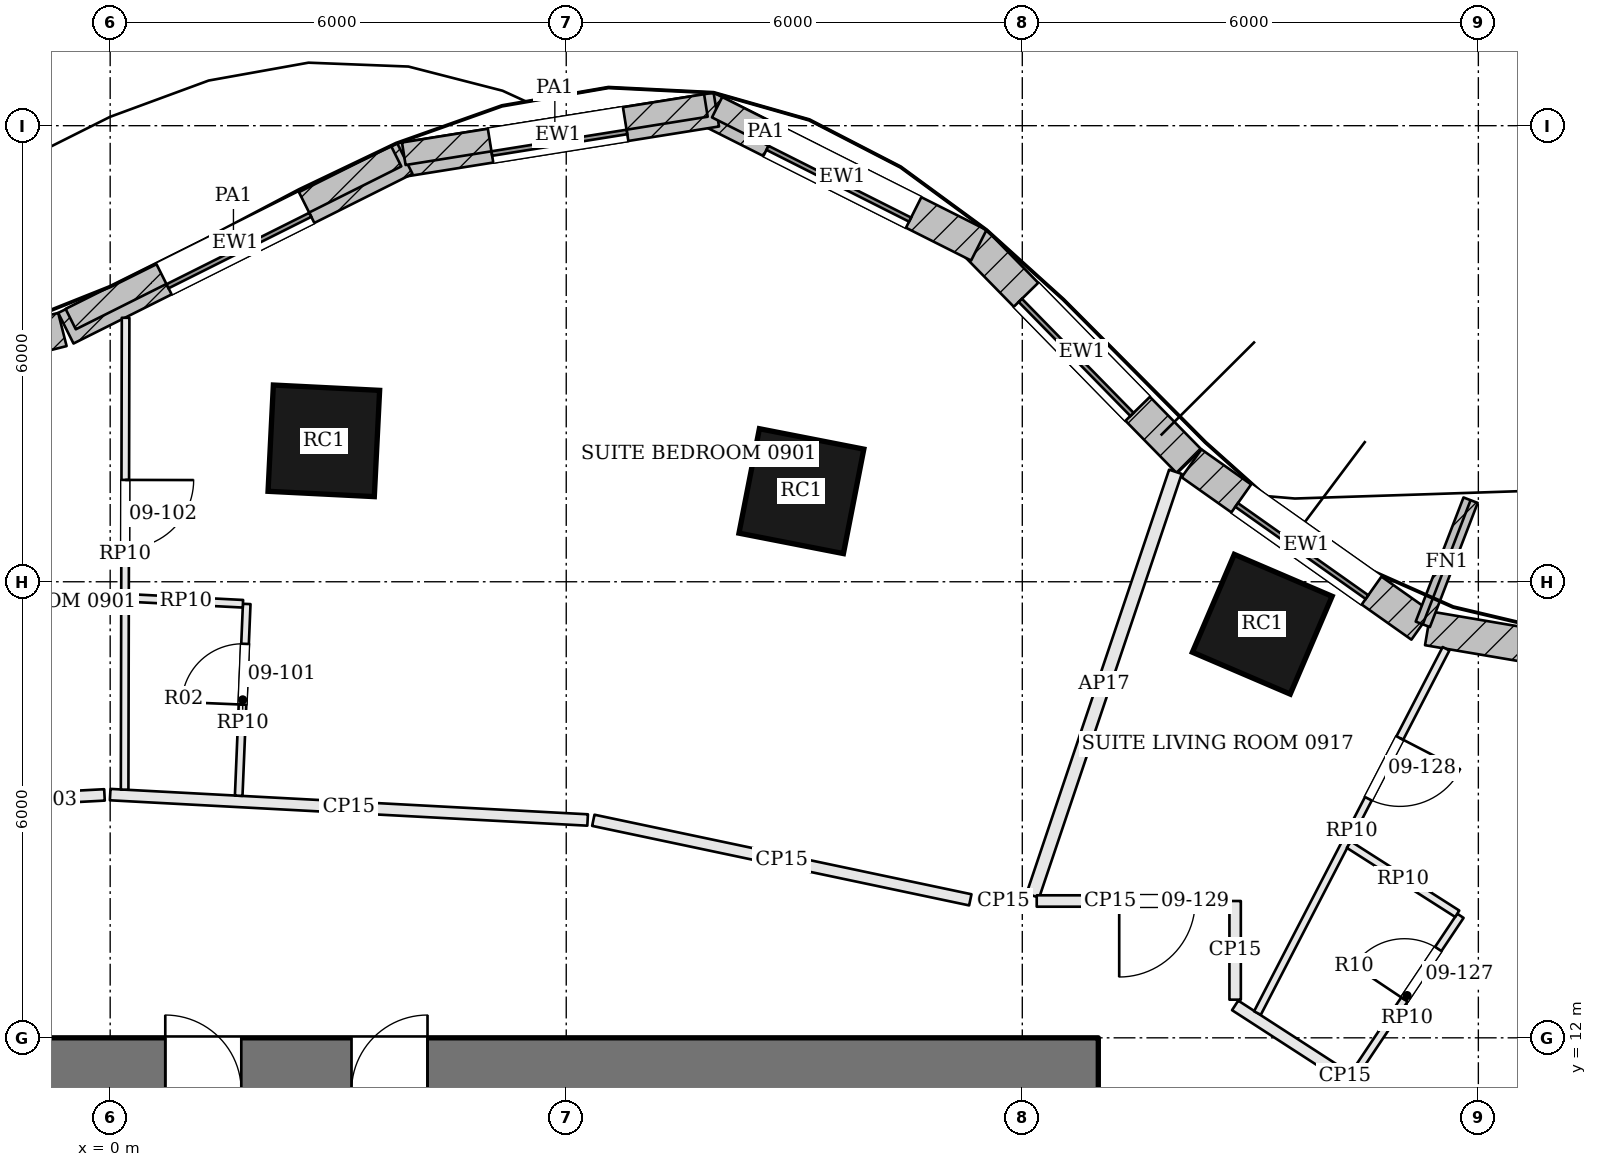
"""IFC4 building model, lengths in metres.
Left out: names, types, materials, properties, quantities, classifications, styles, units other than length and angle.
Written with IfcOpenShell. Run it as: python <this file> out.ifc"""

import sys

from ifc_helpers import new_model, si_unit, direction, frame, frame_2d, origin, origin_2d, place, context, subcontext, project, spatial, rectangle, extrude, element, fill, save


model = new_model("IFC4")
c1 = context("Model", 3, precision=1e-05, world=origin(), true_north=direction((0.0, 1.0)))
c2 = subcontext(c1, "Body", "Model", "MODEL_VIEW")
j1 = project(units=[si_unit("LENGTHUNIT", "METRE"), si_unit("PLANEANGLEUNIT", "RADIAN")], contexts=[c1])
p1 = place(None, origin())
s1 = spatial("IfcSite", under=j1, at=p1, CompositionType="ELEMENT")
p2 = place(p1, origin())
s2 = spatial("IfcBuilding", under=s1, at=p2, CompositionType="ELEMENT")
p3 = place(p2, frame((0.0, 0.0, 48.3)))
s3 = spatial("IfcBuildingStorey", under=s2, at=p3, CompositionType="ELEMENT", Elevation=48.3)
p4 = place(p3, frame((-13.0, 11.3, 0.0), z_axis=(0.0, 0.0, 1.0), x_axis=(1.0, 0.0, 0.0)))
e1 = element("IfcWall", 1, at=p4, inside=s3, PredefinedType="SHEAR", context=c2, shape_type="SweptSolid", body=[
    extrude(rectangle(XDim=26.0, YDim=1.4, at=frame_2d((13.0, 0.0))), origin(), (0.0, 0.0, 1.0), 3.6),
])
p5 = place(p4, frame((8.575, 0.0, 0.0)))
e2 = element("IfcOpeningElement", 2, at=p5, cuts=e1, PredefinedType="OPENING", context=c2, shape_type="SweptSolid", body=[
    extrude(rectangle(XDim=0.7, YDim=2.1, at=frame_2d((0.35, 1.05))), frame((0.0, 0.71, 0.0), z_axis=(0.0, -1.0, 0.0), x_axis=(1.0, 0.0, 0.0)), (0.0, 0.0, 1.0), 1.42),
])
p6 = place(p4, frame((10.875, 0.0, 0.0)))
e3 = element("IfcOpeningElement", 3, at=p6, cuts=e1, PredefinedType="OPENING", context=c2, shape_type="SweptSolid", body=[
    extrude(rectangle(XDim=1.0, YDim=2.1, at=frame_2d((0.5, 1.05))), frame((0.0, 0.71, 0.0), z_axis=(0.0, -1.0, 0.0), x_axis=(1.0, 0.0, 0.0)), (0.0, 0.0, 1.0), 1.42),
])
p7 = place(p4, frame((13.725, 0.0, 0.0)))
e4 = element("IfcOpeningElement", 4, at=p7, cuts=e1, PredefinedType="OPENING", context=c2, shape_type="SweptSolid", body=[
    extrude(rectangle(XDim=1.0, YDim=2.1, at=frame_2d((0.5, 1.05))), frame((0.0, 0.71, 0.0), z_axis=(0.0, -1.0, 0.0), x_axis=(1.0, 0.0, 0.0)), (0.0, 0.0, 1.0), 1.42),
])
p8 = place(p4, frame((16.175, 0.0, 0.0)))
e5 = element("IfcOpeningElement", 5, at=p8, cuts=e1, PredefinedType="OPENING", context=c2, shape_type="SweptSolid", body=[
    extrude(rectangle(XDim=1.0, YDim=2.1, at=frame_2d((0.5, 1.05))), frame((0.0, 0.71, 0.0), z_axis=(0.0, -1.0, 0.0), x_axis=(1.0, 0.0, 0.0)), (0.0, 0.0, 1.0), 1.42),
])
for number, where, z_axis, x_axis in (
    (6, (15.157, 17.441, 0.0), (0.0, 0.0, 1.0), (-0.919, 0.394, 0.0)),
    (7, (9.094, 19.192, 0.0), (0.0, 0.0, 1.0), (-0.981, 0.192, 0.0)),
    (8, (2.811, 19.854, 0.0), (0.0, 0.0, 1.0), (-0.999, 0.05, 0.0)),
):
    element("IfcColumn", number, at=place(p3, frame(where, z_axis=z_axis, x_axis=x_axis)), inside=s3, PredefinedType="COLUMN", context=c2, shape_type="SweptSolid", body=[
        extrude(rectangle(XDim=1.4, YDim=1.4, at=origin_2d()), origin(), (0.0, 0.0, 1.0), 3.6),
    ])
p9 = place(p3, frame((23.284, 16.376, 0.0), z_axis=(0.0, 0.0, 1.0), x_axis=(-0.985861729428, 0.167560885797, 0.0)))
e9 = element("IfcWall", 9, at=p9, inside=s3, PredefinedType="SOLIDWALL", context=c2, shape_type="SweptSolid", body=[
    extrude(rectangle(XDim=6.033, YDim=0.45, at=frame_2d((3.017, 0.0))), origin(), (0.0, 0.0, 1.0), 3.4),
])
p10 = place(p9, frame((1.967, 0.0, 0.9)))
e10 = element("IfcOpeningElement", 10, at=p10, cuts=e9, PredefinedType="OPENING", context=c2, shape_type="SweptSolid", body=[
    extrude(rectangle(XDim=2.1, YDim=2.0, at=frame_2d((1.05, 1.0))), frame((0.0, 0.235, 0.0), z_axis=(0.0, -1.0, 0.0), x_axis=(1.0, 0.0, 0.0)), (0.0, 0.0, 1.0), 0.47),
])
p11 = place(p3, frame((17.249, 17.422, 0.0), z_axis=(0.0, 0.0, 1.0), x_axis=(-0.816589291225, 0.577219134694, 0.0)))
e11 = element("IfcWall", 11, at=p11, inside=s3, PredefinedType="SOLIDWALL", context=c2, shape_type="SweptSolid", body=[
    extrude(rectangle(XDim=3.701, YDim=0.45, at=frame_2d((1.851, 0.0))), origin(), (0.0, 0.0, 1.0), 3.4),
])
p12 = place(p11, frame((0.801, 0.0, 0.9)))
e12 = element("IfcOpeningElement", 12, at=p12, cuts=e11, PredefinedType="OPENING", context=c2, shape_type="SweptSolid", body=[
    extrude(rectangle(XDim=2.1, YDim=2.0, at=frame_2d((1.05, 1.0))), frame((0.0, 0.235, 0.0), z_axis=(0.0, -1.0, 0.0), x_axis=(1.0, 0.0, 0.0)), (0.0, 0.0, 1.0), 0.47),
])
p13 = place(p3, frame((14.195, 19.584, 0.0), z_axis=(0.0, 0.0, 1.0), x_axis=(-0.69962350521, 0.714511687068, 0.0)))
e13 = element("IfcWall", 13, at=p13, inside=s3, PredefinedType="SOLIDWALL", context=c2, shape_type="SweptSolid", body=[
    extrude(rectangle(XDim=4.034, YDim=0.45, at=frame_2d((2.017, 0.0))), origin(), (0.0, 0.0, 1.0), 3.4),
])
p14 = place(p13, frame((0.967, 0.0, 0.9)))
e14 = element("IfcOpeningElement", 14, at=p14, cuts=e13, PredefinedType="OPENING", context=c2, shape_type="SweptSolid", body=[
    extrude(rectangle(XDim=2.1, YDim=2.0, at=frame_2d((1.05, 1.0))), frame((0.0, 0.235, 0.0), z_axis=(0.0, -1.0, 0.0), x_axis=(1.0, 0.0, 0.0)), (0.0, 0.0, 1.0), 0.47),
])
p15 = place(p3, frame((11.428, 22.427, 0.0), z_axis=(0.0, 0.0, 1.0), x_axis=(-0.893343208735, 0.449375023122, 0.0)))
e15 = element("IfcWall", 15, at=p15, inside=s3, PredefinedType="SOLIDWALL", context=c2, shape_type="SweptSolid", body=[
    extrude(rectangle(XDim=4.019, YDim=0.45, at=frame_2d((2.009, 0.0))), origin(), (0.0, 0.0, 1.0), 3.4),
])
p16 = place(p15, frame((0.959, 0.0, 0.9)))
e16 = element("IfcOpeningElement", 16, at=p16, cuts=e15, PredefinedType="OPENING", context=c2, shape_type="SweptSolid", body=[
    extrude(rectangle(XDim=2.1, YDim=2.0, at=frame_2d((1.05, 1.0))), frame((0.0, 0.235, 0.0), z_axis=(0.0, -1.0, 0.0), x_axis=(1.0, 0.0, 0.0)), (0.0, 0.0, 1.0), 0.47),
])
p17 = place(p3, frame((7.975, 24.212, 0.0), z_axis=(0.0, 0.0, 1.0), x_axis=(-0.987470607744, -0.157803038125, 0.0)))
e17 = element("IfcWall", 17, at=p17, inside=s3, PredefinedType="SOLIDWALL", context=c2, shape_type="SweptSolid", body=[
    extrude(rectangle(XDim=4.216, YDim=0.45, at=frame_2d((2.108, 0.0))), origin(), (0.0, 0.0, 1.0), 3.4),
])
p18 = place(p17, frame((1.208, 0.0, 0.9)))
e18 = element("IfcOpeningElement", 18, at=p18, cuts=e17, PredefinedType="OPENING", context=c2, shape_type="SweptSolid", body=[
    extrude(rectangle(XDim=1.8, YDim=2.0, at=frame_2d((0.9, 1.0))), frame((0.0, 0.235, 0.0), z_axis=(0.0, -1.0, 0.0), x_axis=(1.0, 0.0, 0.0)), (0.0, 0.0, 1.0), 0.47),
])
p19 = place(p3, frame((3.877, 23.568, 0.0), z_axis=(0.0, 0.0, 1.0), x_axis=(-0.894241088759, -0.447585606532, 0.0)))
e19 = element("IfcWall", 19, at=p19, inside=s3, PredefinedType="SOLIDWALL", context=c2, shape_type="SweptSolid", body=[
    extrude(rectangle(XDim=4.987, YDim=0.45, at=frame_2d((2.494, 0.0))), origin(), (0.0, 0.0, 1.0), 3.4),
])
p20 = place(p19, frame((1.444, 0.0, 0.9)))
e20 = element("IfcOpeningElement", 20, at=p20, cuts=e19, PredefinedType="OPENING", context=c2, shape_type="SweptSolid", body=[
    extrude(rectangle(XDim=2.1, YDim=2.0, at=frame_2d((1.05, 1.0))), frame((0.0, 0.235, 0.0), z_axis=(0.0, -1.0, 0.0), x_axis=(1.0, 0.0, 0.0)), (0.0, 0.0, 1.0), 0.47),
])
p21 = place(p3, frame((-0.628, 21.319, 0.0), z_axis=(0.0, 0.0, 1.0), x_axis=(-0.969240543873, -0.246115355295, 0.0)))
e21 = element("IfcWall", 21, at=p21, inside=s3, PredefinedType="SOLIDWALL", context=c2, shape_type="SweptSolid", body=[
    extrude(rectangle(XDim=2.743, YDim=0.45, at=frame_2d((1.372, 0.0))), origin(), (0.0, 0.0, 1.0), 3.4),
])
p22 = place(p21, frame((0.321, 0.0, 0.9)))
e22 = element("IfcOpeningElement", 22, at=p22, cuts=e21, PredefinedType="OPENING", context=c2, shape_type="SweptSolid", body=[
    extrude(rectangle(XDim=2.1, YDim=2.0, at=frame_2d((1.05, 1.0))), frame((0.0, 0.235, 0.0), z_axis=(0.0, -1.0, 0.0), x_axis=(1.0, 0.0, 0.0)), (0.0, 0.0, 1.0), 0.47),
])
p23 = place(p3, frame((17.269, 17.44, 0.0), z_axis=(0.0, 0.0, 1.0), x_axis=(0.359381039836, 0.933190906624, 0.0)))
e23 = element("IfcWall", 23, at=p23, inside=s3, PredefinedType="SOLIDWALL", context=c2, shape_type="SweptSolid", body=[
    extrude(rectangle(XDim=1.75, YDim=0.2, at=frame_2d((0.875, 0.0))), origin(), (0.0, 0.0, 1.0), 3.4),
])
p24 = place(p3, frame((9.267, 23.598, 3.6), z_axis=(0.0, 0.0, 1.0), x_axis=(-0.893335936782, 0.449389479242, 0.0)))
e24 = element("IfcWall", 24, at=p24, inside=s3, PredefinedType="PARAPET", context=c2, shape_type="SweptSolid", body=[
    extrude(rectangle(XDim=1.435, YDim=0.3, at=frame_2d((0.718, 0.0))), origin(), (0.0, 0.0, 1.0), 1.1),
])
p25 = place(p3, frame((7.837, 24.266, 3.6), z_axis=(0.0, 0.0, 1.0), x_axis=(-0.987476564543, -0.157765758254, 0.0)))
e25 = element("IfcWall", 25, at=p25, inside=s3, PredefinedType="PARAPET", context=c2, shape_type="SweptSolid", body=[
    extrude(rectangle(XDim=4.025, YDim=0.3, at=frame_2d((2.012, 0.0))), origin(), (0.0, 0.0, 1.0), 1.1),
])
p26 = place(p3, frame((3.763, 23.599, 3.6), z_axis=(0.0, 0.0, 1.0), x_axis=(-0.894243576514, -0.447580636158, 0.0)))
e26 = element("IfcWall", 26, at=p26, inside=s3, PredefinedType="PARAPET", context=c2, shape_type="SweptSolid", body=[
    extrude(rectangle(XDim=4.789, YDim=0.3, at=frame_2d((2.394, 0.0))), origin(), (0.0, 0.0, 1.0), 1.1),
])
p27 = place(p3, frame((12.115, 13.8, 0.0), z_axis=(0.0, 0.0, 1.0), x_axis=(-1.0, 0.0, 0.0)))
e27 = element("IfcWall", 27, at=p27, inside=s3, PredefinedType="PARTITIONING", context=c2, shape_type="SweptSolid", body=[
    extrude(rectangle(XDim=0.725, YDim=0.15, at=frame_2d((0.363, 0.0))), origin(), (0.0, 0.0, 1.0), 2.68),
])
p28 = place(p3, frame((11.316, 13.815, 0.0), z_axis=(0.0, 0.0, 1.0), x_axis=(-0.978460774853, 0.206432827025, 0.0)))
e28 = element("IfcWall", 28, at=p28, inside=s3, PredefinedType="PARTITIONING", context=c2, shape_type="SweptSolid", body=[
    extrude(rectangle(XDim=5.069, YDim=0.15, at=frame_2d((2.534, 0.0))), origin(), (0.0, 0.0, 1.0), 2.68),
])
p29 = place(p3, frame((6.281, 14.866, 0.0), z_axis=(0.0, 0.0, 1.0), x_axis=(-0.998587429539, 0.053133281163, 0.0)))
e29 = element("IfcWall", 29, at=p29, inside=s3, PredefinedType="PARTITIONING", context=c2, shape_type="SweptSolid", body=[
    extrude(rectangle(XDim=6.29, YDim=0.15, at=frame_2d((3.145, 0.0))), origin(), (0.0, 0.0, 1.0), 2.68),
])
p30 = place(p3, frame((-0.075, 15.196, 0.0), z_axis=(0.0, 0.0, 1.0), x_axis=(-0.998591959352, -0.053048079307, 0.0)))
e30 = element("IfcWall", 30, at=p30, inside=s3, PredefinedType="PARTITIONING", context=c2, shape_type="SweptSolid", body=[
    extrude(rectangle(XDim=2.881, YDim=0.15, at=frame_2d((1.44, 0.0))), origin(), (0.0, 0.0, 1.0), 2.68),
])
p31 = place(p30, frame((0.808, 0.0, 0.0)))
e31 = element("IfcOpeningElement", 31, at=p31, cuts=e30, PredefinedType="OPENING", context=c2, shape_type="SweptSolid", body=[
    extrude(rectangle(XDim=1.0, YDim=2.1, at=frame_2d((0.5, 1.05))), frame((0.0, 0.085, 0.0), z_axis=(0.0, -1.0, 0.0), x_axis=(1.0, 0.0, 0.0)), (0.0, 0.0, 1.0), 0.17),
])
p32 = place(p3, frame((14.014, 19.447, 0.0), z_axis=(0.0, 0.0, 1.0), x_axis=(-0.318853578383, -0.947803985828, 0.0)))
e32 = element("IfcWall", 32, at=p32, inside=s3, PredefinedType="PARTITIONING", context=c2, shape_type="SweptSolid", body=[
    extrude(rectangle(XDim=5.883, YDim=0.175, at=frame_2d((2.941, 0.0))), origin(), (0.0, 0.0, 1.0), 2.68),
])
p33 = place(p3, frame((17.691, 10.556, 0.0), z_axis=(0.0, 0.0, 1.0), x_axis=(-0.839564450265, 0.54326009779, 0.0)))
e33 = element("IfcWall", 33, at=p33, inside=s3, PredefinedType="PARTITIONING", context=c2, shape_type="SweptSolid", body=[
    extrude(rectangle(XDim=3.443, YDim=0.15, at=frame_2d((1.722, 0.0))), origin(), (0.0, 0.0, 1.0), 2.68),
])
p34 = place(p3, frame((14.8, 12.502, 0.0), z_axis=(0.0, 0.0, 1.0), x_axis=(-0.000188040613, 0.99999998232, 0.0)))
e34 = element("IfcWall", 34, at=p34, inside=s3, PredefinedType="PARTITIONING", context=c2, shape_type="SweptSolid", body=[
    extrude(rectangle(XDim=1.298, YDim=0.15, at=frame_2d((0.649, 0.0))), origin(), (0.0, 0.0, 1.0), 2.68),
])
p35 = place(p3, frame((14.725, 13.8, 0.0), z_axis=(0.0, 0.0, 1.0), x_axis=(-1.0, 0.0, 0.0)))
e35 = element("IfcWall", 35, at=p35, inside=s3, PredefinedType="PARTITIONING", context=c2, shape_type="SweptSolid", body=[
    extrude(rectangle(XDim=2.535, YDim=0.15, at=frame_2d((1.268, 0.0))), origin(), (0.0, 0.0, 1.0), 2.68),
])
p36 = place(p35, frame((0.45, 0.0, 0.0)))
e36 = element("IfcOpeningElement", 36, at=p36, cuts=e35, PredefinedType="OPENING", context=c2, shape_type="SweptSolid", body=[
    extrude(rectangle(XDim=1.0, YDim=2.1, at=frame_2d((0.5, 1.05))), frame((0.0, 0.085, 0.0), z_axis=(0.0, -1.0, 0.0), x_axis=(1.0, 0.0, 0.0)), (0.0, 0.0, 1.0), 0.17),
])
p37 = place(p3, frame((0.203, 21.473, 0.0), z_axis=(0.0, 0.0, 1.0), x_axis=(-0.002044985499, -0.999997909015, 0.0)))
e37 = element("IfcWall", 37, at=p37, inside=s3, PredefinedType="PARTITIONING", context=c2, shape_type="SweptSolid", body=[
    extrude(rectangle(XDim=6.208, YDim=0.1, at=frame_2d((3.104, 0.0))), origin(), (0.0, 0.0, 1.0), 2.934),
])
p38 = place(p37, frame((2.133, 0.0, 0.0)))
e38 = element("IfcOpeningElement", 38, at=p38, cuts=e37, PredefinedType="OPENING", context=c2, shape_type="SweptSolid", body=[
    extrude(rectangle(XDim=0.9, YDim=2.4, at=frame_2d((0.45, 1.2))), frame((0.0, 0.06, 0.0), z_axis=(0.0, -1.0, 0.0), x_axis=(1.0, 0.0, 0.0)), (0.0, 0.0, 1.0), 0.12),
])
p39 = place(p3, frame((1.691, 15.185, 0.0), z_axis=(0.0, 0.0, 1.0), x_axis=(0.041767275245, 0.999127366615, 0.0)))
e39 = element("IfcWall", 39, at=p39, inside=s3, PredefinedType="PARTITIONING", context=c2, shape_type="SweptSolid", body=[
    extrude(rectangle(XDim=2.525, YDim=0.1, at=frame_2d((1.263, 0.0))), origin(), (0.0, 0.0, 1.0), 2.934),
])
p40 = place(p39, frame((1.2, 0.0, 0.0)))
e40 = element("IfcOpeningElement", 40, at=p40, cuts=e39, PredefinedType="OPENING", context=c2, shape_type="SweptSolid", body=[
    extrude(rectangle(XDim=0.8, YDim=2.1, at=frame_2d((0.4, 1.05))), frame((0.0, 0.06, 0.0), z_axis=(0.0, -1.0, 0.0), x_axis=(1.0, 0.0, 0.0)), (0.0, 0.0, 1.0), 0.12),
])
p41 = place(p3, frame((1.747, 17.71, 0.0), z_axis=(0.0, 0.0, 1.0), x_axis=(-0.998699138712, 0.050990492611, 0.0)))
e41 = element("IfcWall", 41, at=p41, inside=s3, PredefinedType="PARTITIONING", context=c2, shape_type="SweptSolid", body=[
    extrude(rectangle(XDim=1.503, YDim=0.1, at=frame_2d((0.752, 0.0))), origin(), (0.0, 0.0, 1.0), 2.934),
])
p42 = place(p3, frame((17.575, 17.118, 0.0), z_axis=(0.0, 0.0, 1.0), x_axis=(-0.459763790059, -0.88804124755, 0.0)))
e42 = element("IfcWall", 42, at=p42, inside=s3, PredefinedType="PARTITIONING", context=c2, shape_type="SweptSolid", body=[
    extrude(rectangle(XDim=5.397, YDim=0.1, at=frame_2d((2.698, 0.0))), origin(), (0.0, 0.0, 1.0), 2.934),
])
p43 = place(p42, frame((1.322, 0.0, 0.0)))
e43 = element("IfcOpeningElement", 43, at=p43, cuts=e42, PredefinedType="OPENING", context=c2, shape_type="SweptSolid", body=[
    extrude(rectangle(XDim=0.9, YDim=2.4, at=frame_2d((0.45, 1.2))), frame((0.0, 0.06, 0.0), z_axis=(0.0, -1.0, 0.0), x_axis=(1.0, 0.0, 0.0)), (0.0, 0.0, 1.0), 0.12),
])
p44 = place(p3, frame((16.36, 11.507, 0.0), z_axis=(0.0, 0.0, 1.0), x_axis=(0.556060542822, 0.831141788576, 0.0)))
e44 = element("IfcWall", 44, at=p44, inside=s3, PredefinedType="PARTITIONING", context=c2, shape_type="SweptSolid", body=[
    extrude(rectangle(XDim=2.525, YDim=0.1, at=frame_2d((1.262, 0.0))), origin(), (0.0, 0.0, 1.0), 2.934),
])
p45 = place(p44, frame((1.2, 0.0, 0.0)))
e45 = element("IfcOpeningElement", 45, at=p45, cuts=e44, PredefinedType="OPENING", context=c2, shape_type="SweptSolid", body=[
    extrude(rectangle(XDim=0.8, YDim=2.1, at=frame_2d((0.4, 1.05))), frame((0.0, 0.06, 0.0), z_axis=(0.0, -1.0, 0.0), x_axis=(1.0, 0.0, 0.0)), (0.0, 0.0, 1.0), 0.12),
])
p46 = place(p3, frame((17.722, 13.632, 0.0), z_axis=(0.0, 0.0, 1.0), x_axis=(-0.843078245163, 0.537790918977, 0.0)))
e46 = element("IfcWall", 46, at=p46, inside=s3, PredefinedType="PARTITIONING", context=c2, shape_type="SweptSolid", body=[
    extrude(rectangle(XDim=1.691, YDim=0.1, at=frame_2d((0.845, 0.0))), origin(), (0.0, 0.0, 1.0), 2.934),
])
p47 = place(p12, origin())
e47 = element("IfcWindow", 47, at=p47, inside=s3, PartitioningType="SINGLE_PANEL", PredefinedType="WINDOW", context=c2, shape_type="SweptSolid", body=[
    extrude(rectangle(XDim=2.1, YDim=2.0, at=frame_2d((1.05, 1.0))), frame((0.0, 0.135, 0.0), z_axis=(0.0, -1.0, 0.0), x_axis=(1.0, 0.0, 0.0)), (0.0, 0.0, 1.0), 0.06),
])
fill(e12, e47)
p48 = place(p14, origin())
e48 = element("IfcWindow", 48, at=p48, inside=s3, PartitioningType="SINGLE_PANEL", PredefinedType="WINDOW", context=c2, shape_type="SweptSolid", body=[
    extrude(rectangle(XDim=2.1, YDim=2.0, at=frame_2d((1.05, 1.0))), frame((0.0, 0.135, 0.0), z_axis=(0.0, -1.0, 0.0), x_axis=(1.0, 0.0, 0.0)), (0.0, 0.0, 1.0), 0.06),
])
fill(e14, e48)
p49 = place(p16, origin())
e49 = element("IfcWindow", 49, at=p49, inside=s3, PartitioningType="SINGLE_PANEL", PredefinedType="WINDOW", context=c2, shape_type="SweptSolid", body=[
    extrude(rectangle(XDim=2.1, YDim=2.0, at=frame_2d((1.05, 1.0))), frame((0.0, 0.135, 0.0), z_axis=(0.0, -1.0, 0.0), x_axis=(1.0, 0.0, 0.0)), (0.0, 0.0, 1.0), 0.06),
])
fill(e16, e49)
p50 = place(p18, origin())
e50 = element("IfcWindow", 50, at=p50, inside=s3, PartitioningType="SINGLE_PANEL", PredefinedType="WINDOW", context=c2, shape_type="SweptSolid", body=[
    extrude(rectangle(XDim=1.8, YDim=2.0, at=frame_2d((0.9, 1.0))), frame((0.0, 0.135, 0.0), z_axis=(0.0, -1.0, 0.0), x_axis=(1.0, 0.0, 0.0)), (0.0, 0.0, 1.0), 0.06),
])
fill(e18, e50)
p51 = place(p20, origin())
e51 = element("IfcWindow", 51, at=p51, inside=s3, PartitioningType="SINGLE_PANEL", PredefinedType="WINDOW", context=c2, shape_type="SweptSolid", body=[
    extrude(rectangle(XDim=2.1, YDim=2.0, at=frame_2d((1.05, 1.0))), frame((0.0, 0.135, 0.0), z_axis=(0.0, -1.0, 0.0), x_axis=(1.0, 0.0, 0.0)), (0.0, 0.0, 1.0), 0.06),
])
fill(e20, e51)
p52 = place(p40, origin())
e52 = element("IfcDoor", 52, at=p52, inside=s3, OperationType="SINGLE_SWING_LEFT", PredefinedType="DOOR", context=c2, shape_type="SweptSolid", body=[
    extrude(rectangle(XDim=0.8, YDim=2.1, at=frame_2d((0.4, 1.05))), frame((0.0, 0.025, 0.0), z_axis=(0.0, -1.0, 0.0), x_axis=(1.0, 0.0, 0.0)), (0.0, 0.0, 1.0), 0.05),
])
fill(e40, e52)
p53 = place(p38, origin())
e53 = element("IfcDoor", 53, at=p53, inside=s3, OperationType="SINGLE_SWING_LEFT", PredefinedType="DOOR", context=c2, shape_type="SweptSolid", body=[
    extrude(rectangle(XDim=0.9, YDim=2.4, at=frame_2d((0.45, 1.2))), frame((0.0, 0.025, 0.0), z_axis=(0.0, -1.0, 0.0), x_axis=(1.0, 0.0, 0.0)), (0.0, 0.0, 1.0), 0.05),
])
fill(e38, e53)
p54 = place(p45, origin())
e54 = element("IfcDoor", 54, at=p54, inside=s3, OperationType="SINGLE_SWING_LEFT", PredefinedType="DOOR", context=c2, shape_type="SweptSolid", body=[
    extrude(rectangle(XDim=0.8, YDim=2.1, at=frame_2d((0.4, 1.05))), frame((0.0, 0.025, 0.0), z_axis=(0.0, -1.0, 0.0), x_axis=(1.0, 0.0, 0.0)), (0.0, 0.0, 1.0), 0.05),
])
fill(e45, e54)
p55 = place(p43, origin())
e55 = element("IfcDoor", 55, at=p55, inside=s3, OperationType="SINGLE_SWING_LEFT", PredefinedType="DOOR", context=c2, shape_type="SweptSolid", body=[
    extrude(rectangle(XDim=0.9, YDim=2.4, at=frame_2d((0.45, 1.2))), frame((0.0, 0.025, 0.0), z_axis=(0.0, -1.0, 0.0), x_axis=(1.0, 0.0, 0.0)), (0.0, 0.0, 1.0), 0.05),
])
fill(e43, e55)
p56 = place(p36, origin())
e56 = element("IfcDoor", 56, at=p56, inside=s3, OperationType="SINGLE_SWING_RIGHT", PredefinedType="DOOR", context=c2, shape_type="SweptSolid", body=[
    extrude(rectangle(XDim=1.0, YDim=2.1, at=frame_2d((0.5, 1.05))), frame((0.0, 0.025, 0.0), z_axis=(0.0, -1.0, 0.0), x_axis=(1.0, 0.0, 0.0)), (0.0, 0.0, 1.0), 0.05),
])
fill(e36, e56)
save(model, sys.argv[1])
